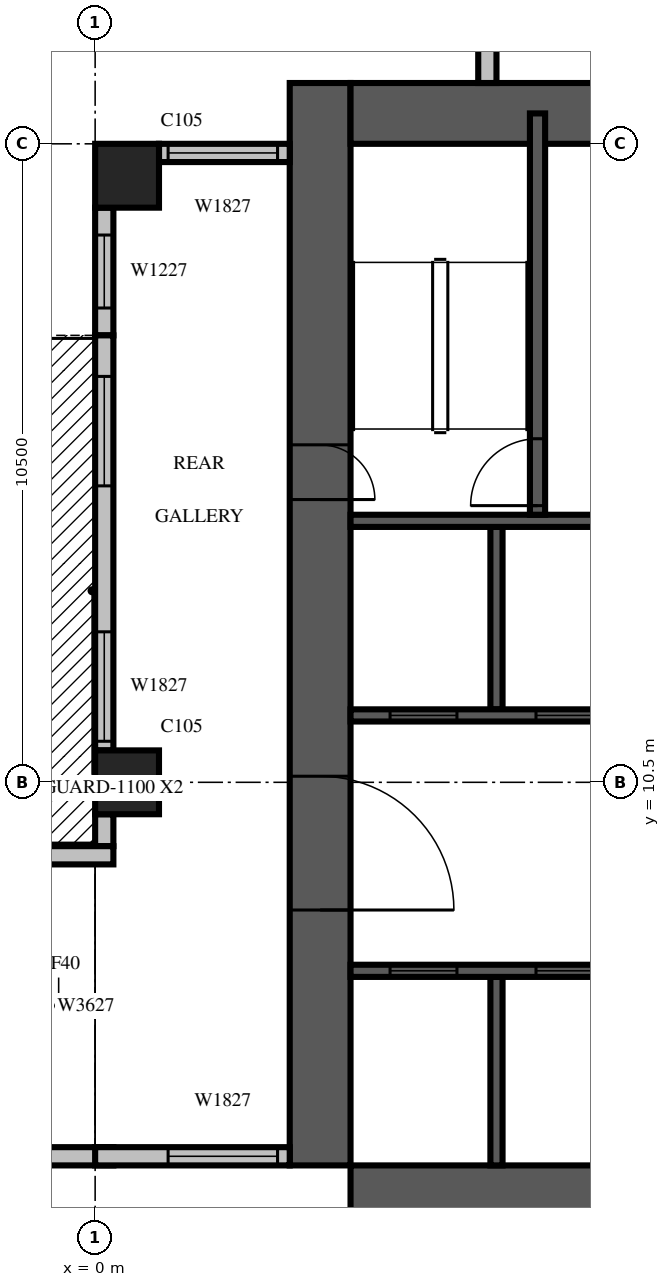
"""IFC4 building model, lengths in metres.
Left out: names, types, materials, properties, quantities, classifications, styles, units other than length and angle.
Written with IfcOpenShell. Run it as: python <this file> out.ifc"""

import sys

from ifc_helpers import new_model, si_unit, direction, frame, frame_2d, origin, origin_2d, place, context, subcontext, project, spatial, rectangle, extrude, source, transform, mapped, element, fill, save


model = new_model("IFC4")
c1 = context("Model", 3, precision=1e-05, world=origin(), true_north=direction((0.0, 1.0)))
c2 = subcontext(c1, "Body", "Model", "MODEL_VIEW")
j1 = project(units=[si_unit("LENGTHUNIT", "METRE"), si_unit("PLANEANGLEUNIT", "RADIAN")], contexts=[c1])
p1 = place(None, origin())
s1 = spatial("IfcSite", under=j1, at=p1, CompositionType="ELEMENT")
p2 = place(p1, origin())
s2 = spatial("IfcBuilding", under=s1, at=p2, CompositionType="ELEMENT")
p3 = place(p2, frame((0.0, 0.0, 149.7)))
s3 = spatial("IfcBuildingStorey", under=s2, at=p3, CompositionType="ELEMENT", Elevation=149.7)
m1 = source(origin(), c2, "Body", "SweptSolid", [
    extrude(rectangle(XDim=1.05, YDim=1.05, at=origin_2d()), origin(), (0.0, 0.0, 1.0), 4.2),
])
for number, where, z_axis, x_axis in (
    (1, (0.525, 10.5, 0.0), (0.0, 0.0, 1.0), (1.0, 0.0, 0.0)),
    (2, (0.525, 20.475, 0.0), (0.0, 0.0, 1.0), (1.0, 0.0, 0.0)),
):
    element("IfcColumn", number, at=place(p3, frame(where, z_axis=z_axis, x_axis=x_axis)), inside=s3, PredefinedType="COLUMN", context=c2, shape_type="MappedRepresentation", body=[
        mapped(m1, transform((0.0, 0.0, 0.0), scale=1.0)),
    ])
m2 = source(origin(), c2, "Body", "SweptSolid", [
    extrude(rectangle(XDim=17.8, YDim=1.0, at=frame_2d((8.9, 0.0))), origin(), (0.0, 0.0, 1.0), 4.2),
])
p4 = place(p3, frame((3.7, 4.2, 0.0), z_axis=(0.0, 0.0, 1.0), x_axis=(0.0, 1.0, 0.0)))
e3 = element("IfcWall", 3, at=p4, inside=s3, PredefinedType="SHEAR", context=c2, shape_type="MappedRepresentation", body=[
    mapped(m2, transform((0.0, 0.0, 0.0), scale=1.0)),
])
m3 = source(origin(), c2, "Body", "SweptSolid", [
    extrude(rectangle(XDim=2.2, YDim=2.1, at=frame_2d((1.1, 1.05))), frame((0.0, 0.51, 0.0), z_axis=(0.0, -1.0, 0.0), x_axis=(1.0, 0.0, 0.0)), (0.0, 0.0, 1.0), 1.02),
])
p5 = place(p4, frame((4.2, 0.0, 0.0)))
e4 = element("IfcOpeningElement", 4, at=p5, cuts=e3, PredefinedType="OPENING", context=c2, shape_type="MappedRepresentation", body=[
    mapped(m3, transform((0.0, 0.0, 0.0), scale=1.0)),
])
m4 = source(origin(), c2, "Body", "SweptSolid", [
    extrude(rectangle(XDim=0.9, YDim=2.1, at=frame_2d((0.45, 1.05))), frame((0.0, 0.51, 0.0), z_axis=(0.0, -1.0, 0.0), x_axis=(1.0, 0.0, 0.0)), (0.0, 0.0, 1.0), 1.02),
])
p6 = place(p4, frame((10.95, 0.0, 0.0)))
e5 = element("IfcOpeningElement", 5, at=p6, cuts=e3, PredefinedType="OPENING", context=c2, shape_type="MappedRepresentation", body=[
    mapped(m4, transform((0.0, 0.0, 0.0), scale=1.0)),
])
p7 = place(p3, frame((4.2, 3.7, 0.0), z_axis=(0.0, 0.0, 1.0), x_axis=(1.0, 0.0, 0.0)))
e6 = element("IfcWall", 6, at=p7, inside=s3, PredefinedType="SHEAR", context=c2, shape_type="MappedRepresentation", body=[
    mapped(m2, transform((0.0, 0.0, 0.0), scale=1.0)),
])
m5 = source(origin(), c2, "Body", "SweptSolid", [
    extrude(rectangle(XDim=16.8, YDim=1.0, at=frame_2d((8.4, 0.0))), origin(), (0.0, 0.0, 1.0), 4.2),
])
p8 = place(p3, frame((4.2, 21.5, 0.0), z_axis=(0.0, 0.0, 1.0), x_axis=(1.0, 0.0, 0.0)))
e7 = element("IfcWall", 7, at=p8, inside=s3, PredefinedType="SHEAR", context=c2, shape_type="MappedRepresentation", body=[
    mapped(m5, transform((0.0, 0.0, 0.0), scale=1.0)),
])
m6 = source(origin(), c2, "Body", "SweptSolid", [
    extrude(rectangle(XDim=1.2, YDim=2.1, at=frame_2d((0.6, 1.05))), frame((0.0, 0.51, 0.0), z_axis=(0.0, -1.0, 0.0), x_axis=(1.0, 0.0, 0.0)), (0.0, 0.0, 1.0), 1.02),
])
p9 = place(p8, frame((6.2, 0.0, 0.0)))
e8 = element("IfcOpeningElement", 8, at=p9, cuts=e7, PredefinedType="OPENING", context=c2, shape_type="MappedRepresentation", body=[
    mapped(m6, transform((0.0, 0.0, 0.0), scale=1.0)),
])
m7 = source(origin(), c2, "Body", "SweptSolid", [
    extrude(rectangle(XDim=16.4, YDim=0.3, at=frame_2d((8.2, 0.0))), origin(), (0.0, 0.0, 1.0), 3.8),
])
p10 = place(p3, frame((6.45, 38.4, 0.0), z_axis=(0.0, 0.0, 1.0), x_axis=(0.0, -1.0, 0.0)))
e9 = element("IfcWall", 9, at=p10, inside=s3, PredefinedType="STANDARD", context=c2, shape_type="MappedRepresentation", body=[
    mapped(m7, transform((0.0, 0.0, 0.0), scale=1.0)),
])
m8 = source(origin(), c2, "Body", "SweptSolid", [
    extrude(rectangle(XDim=1.8, YDim=2.7, at=frame_2d((0.9, 1.35))), frame((0.0, 0.16, 0.0), z_axis=(0.0, -1.0, 0.0), x_axis=(1.0, 0.0, 0.0)), (0.0, 0.0, 1.0), 0.32),
])
p11 = place(p10, frame((1.15, 0.0, 0.6)))
e10 = element("IfcOpeningElement", 10, at=p11, cuts=e9, PredefinedType="OPENING", context=c2, shape_type="MappedRepresentation", body=[
    mapped(m8, transform((0.0, 0.0, 0.0), scale=1.0)),
])
m9 = source(origin(), c2, "Body", "SweptSolid", [
    extrude(rectangle(XDim=2.4, YDim=2.7, at=frame_2d((1.2, 1.35))), frame((0.0, 0.16, 0.0), z_axis=(0.0, -1.0, 0.0), x_axis=(1.0, 0.0, 0.0)), (0.0, 0.0, 1.0), 0.32),
])
p12 = place(p10, frame((4.75, 0.0, 0.6)))
e11 = element("IfcOpeningElement", 11, at=p12, cuts=e9, PredefinedType="OPENING", context=c2, shape_type="MappedRepresentation", body=[
    mapped(m9, transform((0.0, 0.0, 0.0), scale=1.0)),
])
m10 = source(origin(), c2, "Body", "SweptSolid", [
    extrude(rectangle(XDim=1.2, YDim=2.7, at=frame_2d((0.6, 1.35))), frame((0.0, 0.16, 0.0), z_axis=(0.0, -1.0, 0.0), x_axis=(1.0, 0.0, 0.0)), (0.0, 0.0, 1.0), 0.32),
])
p13 = place(p10, frame((12.912, 0.0, 0.6)))
e12 = element("IfcOpeningElement", 12, at=p13, cuts=e9, PredefinedType="OPENING", context=c2, shape_type="MappedRepresentation", body=[
    mapped(m10, transform((0.0, 0.0, 0.0), scale=1.0)),
])
m11 = source(origin(), c2, "Body", "SweptSolid", [
    extrude(rectangle(XDim=1.0, YDim=2.1, at=frame_2d((0.5, 1.05))), frame((0.0, 0.16, 0.0), z_axis=(0.0, -1.0, 0.0), x_axis=(1.0, 0.0, 0.0)), (0.0, 0.0, 1.0), 0.32),
])
p14 = place(p10, frame((10.142, 0.0, 0.0)))
e13 = element("IfcOpeningElement", 13, at=p14, cuts=e9, PredefinedType="OPENING", context=c2, shape_type="MappedRepresentation", body=[
    mapped(m11, transform((0.0, 0.0, 0.0), scale=1.0)),
])
m12 = source(origin(), c2, "Body", "SweptSolid", [
    extrude(rectangle(XDim=2.15, YDim=0.3, at=frame_2d((1.075, 0.0))), origin(), (0.0, 0.0, 1.0), 3.8),
])
p15 = place(p3, frame((3.2, 20.85, 0.0), z_axis=(0.0, 0.0, 1.0), x_axis=(-1.0, 0.0, 0.0)))
e14 = element("IfcWall", 14, at=p15, inside=s3, PredefinedType="STANDARD", context=c2, shape_type="MappedRepresentation", body=[
    mapped(m12, transform((0.0, 0.0, 0.0), scale=1.0)),
])
p16 = place(p15, frame((0.2, 0.0, 0.6)))
e15 = element("IfcOpeningElement", 15, at=p16, cuts=e14, PredefinedType="OPENING", context=c2, shape_type="MappedRepresentation", body=[
    mapped(m8, transform((0.0, 0.0, 0.0), scale=1.0)),
])
m13 = source(origin(), c2, "Body", "SweptSolid", [
    extrude(rectangle(XDim=2.1, YDim=0.3, at=frame_2d((1.05, 0.0))), origin(), (0.0, 0.0, 1.0), 3.8),
])
p17 = place(p3, frame((0.15, 19.95, 0.0), z_axis=(0.0, 0.0, 1.0), x_axis=(0.0, -1.0, 0.0)))
e16 = element("IfcWall", 16, at=p17, inside=s3, PredefinedType="STANDARD", context=c2, shape_type="MappedRepresentation", body=[
    mapped(m13, transform((0.0, 0.0, 0.0), scale=1.0)),
])
p18 = place(p17, frame((0.45, 0.0, 0.6)))
e17 = element("IfcOpeningElement", 17, at=p18, cuts=e16, PredefinedType="OPENING", context=c2, shape_type="MappedRepresentation", body=[
    mapped(m10, transform((0.0, 0.0, 0.0), scale=1.0)),
])
m14 = source(origin(), c2, "Body", "SweptSolid", [
    extrude(rectangle(XDim=6.825, YDim=0.3, at=frame_2d((3.413, 0.0))), origin(), (0.0, 0.0, 1.0), 3.8),
])
p19 = place(p3, frame((0.15, 17.85, 0.0), z_axis=(0.0, 0.0, 1.0), x_axis=(0.0, -1.0, 0.0)))
e18 = element("IfcWall", 18, at=p19, inside=s3, PredefinedType="STANDARD", context=c2, shape_type="MappedRepresentation", body=[
    mapped(m14, transform((0.0, 0.0, 0.0), scale=1.0)),
])
m15 = source(origin(), c2, "Body", "SweptSolid", [
    extrude(rectangle(XDim=1.8, YDim=2.4, at=frame_2d((0.9, 1.2))), frame((0.0, 0.16, 0.0), z_axis=(0.0, -1.0, 0.0), x_axis=(1.0, 0.0, 0.0)), (0.0, 0.0, 1.0), 0.32),
])
p20 = place(p19, frame((0.675, 0.0, 0.0)))
e19 = element("IfcOpeningElement", 19, at=p20, cuts=e18, PredefinedType="OPENING", context=c2, shape_type="MappedRepresentation", body=[
    mapped(m15, transform((0.0, 0.0, 0.0), scale=1.0)),
])
p21 = place(p19, frame((4.875, 0.0, 0.6)))
e20 = element("IfcOpeningElement", 20, at=p21, cuts=e18, PredefinedType="OPENING", context=c2, shape_type="MappedRepresentation", body=[
    mapped(m8, transform((0.0, 0.0, 0.0), scale=1.0)),
])
m16 = source(origin(), c2, "Body", "SweptSolid", [
    extrude(rectangle(XDim=0.525, YDim=0.3, at=frame_2d((0.263, 0.0))), origin(), (0.0, 0.0, 1.0), 3.8),
])
p22 = place(p3, frame((0.15, 9.975, 0.0), z_axis=(0.0, 0.0, 1.0), x_axis=(0.0, -1.0, 0.0)))
e21 = element("IfcWall", 21, at=p22, inside=s3, PredefinedType="STANDARD", context=c2, shape_type="MappedRepresentation", body=[
    mapped(m16, transform((0.0, 0.0, 0.0), scale=1.0)),
])
m17 = source(origin(), c2, "Body", "SweptSolid", [
    extrude(rectangle(XDim=1.2, YDim=0.3, at=frame_2d((0.6, 0.0))), origin(), (0.0, 0.0, 1.0), 3.8),
])
for number, where, z_axis, x_axis in (
    (22, (0.3, 9.3, 0.0), (0.0, 0.0, 1.0), (-1.0, 0.0, 0.0)),
    (23, (0.3, 4.35, 0.0), (0.0, 0.0, 1.0), (-1.0, 0.0, 0.0)),
):
    element("IfcWall", number, at=place(p3, frame(where, z_axis=z_axis, x_axis=x_axis)), inside=s3, PredefinedType="STANDARD", context=c2, shape_type="MappedRepresentation", body=[
        mapped(m17, transform((0.0, 0.0, 0.0), scale=1.0)),
    ])
m18 = source(origin(), c2, "Body", "SweptSolid", [
    extrude(rectangle(XDim=3.2, YDim=0.3, at=frame_2d((1.6, 0.0))), origin(), (0.0, 0.0, 1.0), 3.8),
])
p23 = place(p3, frame((0.0, 4.35, 0.0), z_axis=(0.0, 0.0, 1.0), x_axis=(1.0, 0.0, 0.0)))
e24 = element("IfcWall", 24, at=p23, inside=s3, PredefinedType="STANDARD", context=c2, shape_type="MappedRepresentation", body=[
    mapped(m18, transform((0.0, 0.0, 0.0), scale=1.0)),
])
p24 = place(p23, frame((1.2, 0.0, 0.6)))
e25 = element("IfcOpeningElement", 25, at=p24, cuts=e24, PredefinedType="OPENING", context=c2, shape_type="MappedRepresentation", body=[
    mapped(m8, transform((0.0, 0.0, 0.0), scale=1.0)),
])
m19 = source(origin(), c2, "Body", "SweptSolid", [
    extrude(rectangle(XDim=3.1, YDim=0.2, at=frame_2d((1.55, 0.0))), origin(), (0.0, 0.0, 1.0), 4.2),
])
p25 = place(p3, frame((6.6, 4.2, 0.0), z_axis=(0.0, 0.0, 1.0), x_axis=(0.0, 1.0, 0.0)))
e26 = element("IfcWall", 26, at=p25, inside=s3, PredefinedType="SOLIDWALL", context=c2, shape_type="MappedRepresentation", body=[
    mapped(m19, transform((0.0, 0.0, 0.0), scale=1.0)),
])
m20 = source(origin(), c2, "Body", "SweptSolid", [
    extrude(rectangle(XDim=3.0, YDim=0.2, at=frame_2d((1.5, 0.0))), origin(), (0.0, 0.0, 1.0), 4.2),
])
p26 = place(p3, frame((6.6, 11.7, 0.0), z_axis=(0.0, 0.0, 1.0), x_axis=(0.0, 1.0, 0.0)))
e27 = element("IfcWall", 27, at=p26, inside=s3, PredefinedType="SOLIDWALL", context=c2, shape_type="MappedRepresentation", body=[
    mapped(m20, transform((0.0, 0.0, 0.0), scale=1.0)),
])
m21 = source(origin(), c2, "Body", "SweptSolid", [
    extrude(rectangle(XDim=16.8, YDim=0.2, at=frame_2d((8.4, 0.0))), origin(), (0.0, 0.0, 1.0), 4.2),
])
p27 = place(p3, frame((4.2, 7.4, 0.0), z_axis=(0.0, 0.0, 1.0), x_axis=(1.0, 0.0, 0.0)))
e28 = element("IfcWall", 28, at=p27, inside=s3, PredefinedType="SOLIDWALL", context=c2, shape_type="MappedRepresentation", body=[
    mapped(m21, transform((0.0, 0.0, 0.0), scale=1.0)),
])
m22 = source(origin(), c2, "Body", "SweptSolid", [
    extrude(rectangle(XDim=1.1, YDim=2.1, at=frame_2d((0.55, 1.05))), frame((0.0, 0.11, 0.0), z_axis=(0.0, -1.0, 0.0), x_axis=(1.0, 0.0, 0.0)), (0.0, 0.0, 1.0), 0.22),
])
p28 = place(p27, frame((0.65, 0.0, 0.0)))
e29 = element("IfcOpeningElement", 29, at=p28, cuts=e28, PredefinedType="OPENING", context=c2, shape_type="MappedRepresentation", body=[
    mapped(m22, transform((0.0, 0.0, 0.0), scale=1.0)),
])
p29 = place(p27, frame((3.05, 0.0, 0.0)))
e30 = element("IfcOpeningElement", 30, at=p29, cuts=e28, PredefinedType="OPENING", context=c2, shape_type="MappedRepresentation", body=[
    mapped(m22, transform((0.0, 0.0, 0.0), scale=1.0)),
])
p30 = place(p27, frame((5.45, 0.0, 0.0)))
e31 = element("IfcOpeningElement", 31, at=p30, cuts=e28, PredefinedType="OPENING", context=c2, shape_type="MappedRepresentation", body=[
    mapped(m22, transform((0.0, 0.0, 0.0), scale=1.0)),
])
p31 = place(p27, frame((7.85, 0.0, 0.0)))
e32 = element("IfcOpeningElement", 32, at=p31, cuts=e28, PredefinedType="OPENING", context=c2, shape_type="MappedRepresentation", body=[
    mapped(m22, transform((0.0, 0.0, 0.0), scale=1.0)),
])
p32 = place(p3, frame((4.2, 11.6, 0.0), z_axis=(0.0, 0.0, 1.0), x_axis=(1.0, 0.0, 0.0)))
e33 = element("IfcWall", 33, at=p32, inside=s3, PredefinedType="SOLIDWALL", context=c2, shape_type="MappedRepresentation", body=[
    mapped(m21, transform((0.0, 0.0, 0.0), scale=1.0)),
])
p33 = place(p32, frame((0.65, 0.0, 0.0)))
e34 = element("IfcOpeningElement", 34, at=p33, cuts=e33, PredefinedType="OPENING", context=c2, shape_type="MappedRepresentation", body=[
    mapped(m22, transform((0.0, 0.0, 0.0), scale=1.0)),
])
p34 = place(p32, frame((3.05, 0.0, 0.0)))
e35 = element("IfcOpeningElement", 35, at=p34, cuts=e33, PredefinedType="OPENING", context=c2, shape_type="MappedRepresentation", body=[
    mapped(m22, transform((0.0, 0.0, 0.0), scale=1.0)),
])
p35 = place(p32, frame((5.45, 0.0, 0.0)))
e36 = element("IfcOpeningElement", 36, at=p35, cuts=e33, PredefinedType="OPENING", context=c2, shape_type="MappedRepresentation", body=[
    mapped(m22, transform((0.0, 0.0, 0.0), scale=1.0)),
])
p36 = place(p3, frame((4.2, 14.8, 0.0), z_axis=(0.0, 0.0, 1.0), x_axis=(1.0, 0.0, 0.0)))
e37 = element("IfcWall", 37, at=p36, inside=s3, PredefinedType="SOLIDWALL", context=c2, shape_type="MappedRepresentation", body=[
    mapped(m21, transform((0.0, 0.0, 0.0), scale=1.0)),
])
p37 = place(p36, frame((10.25, 0.0, 0.0)))
e38 = element("IfcOpeningElement", 38, at=p37, cuts=e37, PredefinedType="OPENING", context=c2, shape_type="MappedRepresentation", body=[
    mapped(m22, transform((0.0, 0.0, 0.0), scale=1.0)),
])
p38 = place(p36, frame((12.65, 0.0, 0.0)))
e39 = element("IfcOpeningElement", 39, at=p38, cuts=e37, PredefinedType="OPENING", context=c2, shape_type="MappedRepresentation", body=[
    mapped(m22, transform((0.0, 0.0, 0.0), scale=1.0)),
])
p39 = place(p36, frame((15.05, 0.0, 0.0)))
e40 = element("IfcOpeningElement", 40, at=p39, cuts=e37, PredefinedType="OPENING", context=c2, shape_type="MappedRepresentation", body=[
    mapped(m22, transform((0.0, 0.0, 0.0), scale=1.0)),
])
m23 = source(origin(), c2, "Body", "SweptSolid", [
    extrude(rectangle(XDim=6.6, YDim=0.25, at=frame_2d((3.3, 0.0))), origin(), (0.0, 0.0, 1.0), 3.8),
])
p40 = place(p3, frame((7.275, 14.9, 0.0), z_axis=(0.0, 0.0, 1.0), x_axis=(0.0, 1.0, 0.0)))
e41 = element("IfcWall", 41, at=p40, inside=s3, PredefinedType="SOLIDWALL", context=c2, shape_type="MappedRepresentation", body=[
    mapped(m23, transform((0.0, 0.0, 0.0), scale=1.0)),
])
m24 = source(origin(), c2, "Body", "SweptSolid", [
    extrude(rectangle(XDim=1.1, YDim=2.1, at=frame_2d((0.55, 1.05))), frame((0.0, 0.135, 0.0), z_axis=(0.0, -1.0, 0.0), x_axis=(1.0, 0.0, 0.0)), (0.0, 0.0, 1.0), 0.27),
])
p41 = place(p40, frame((0.15, 0.0, 0.0)))
e42 = element("IfcOpeningElement", 42, at=p41, cuts=e41, PredefinedType="OPENING", context=c2, shape_type="MappedRepresentation", body=[
    mapped(m24, transform((0.0, 0.0, 0.0), scale=1.0)),
])
m25 = source(origin(), c2, "Body", "SweptSolid", [
    extrude(rectangle(XDim=1.8, YDim=2.7, at=frame_2d((0.9, 1.35))), frame((0.0, 0.03, 0.0), z_axis=(0.0, -1.0, 0.0), x_axis=(1.0, 0.0, 0.0)), (0.0, 0.0, 1.0), 0.06),
])
p42 = place(p16, origin())
e43 = element("IfcWindow", 43, at=p42, inside=s3, PartitioningType="SINGLE_PANEL", PredefinedType="WINDOW", context=c2, shape_type="MappedRepresentation", body=[
    mapped(m25, transform((0.0, 0.0, 0.0), scale=1.0)),
])
fill(e15, e43)
m26 = source(origin(), c2, "Body", "SweptSolid", [
    extrude(rectangle(XDim=1.2, YDim=2.7, at=frame_2d((0.6, 1.35))), frame((0.0, 0.03, 0.0), z_axis=(0.0, -1.0, 0.0), x_axis=(1.0, 0.0, 0.0)), (0.0, 0.0, 1.0), 0.06),
])
p43 = place(p18, origin())
e44 = element("IfcWindow", 44, at=p43, inside=s3, PartitioningType="SINGLE_PANEL", PredefinedType="WINDOW", context=c2, shape_type="MappedRepresentation", body=[
    mapped(m26, transform((0.0, 0.0, 0.0), scale=1.0)),
])
fill(e17, e44)
m27 = source(origin(), c2, "Body", "SweptSolid", [
    extrude(rectangle(XDim=1.8, YDim=2.4, at=frame_2d((0.9, 1.2))), frame((0.0, 0.025, 0.0), z_axis=(0.0, -1.0, 0.0), x_axis=(1.0, 0.0, 0.0)), (0.0, 0.0, 1.0), 0.05),
])
p44 = place(p20, origin())
e45 = element("IfcDoor", 45, at=p44, inside=s3, OperationType="SLIDING_TO_LEFT", PredefinedType="DOOR", context=c2, shape_type="MappedRepresentation", body=[
    mapped(m27, transform((0.0, 0.0, 0.0), scale=1.0)),
])
fill(e19, e45)
p45 = place(p21, origin())
e46 = element("IfcWindow", 46, at=p45, inside=s3, PartitioningType="SINGLE_PANEL", PredefinedType="WINDOW", context=c2, shape_type="MappedRepresentation", body=[
    mapped(m25, transform((0.0, 0.0, 0.0), scale=1.0)),
])
fill(e20, e46)
p46 = place(p24, origin())
e47 = element("IfcWindow", 47, at=p46, inside=s3, PartitioningType="SINGLE_PANEL", PredefinedType="WINDOW", context=c2, shape_type="MappedRepresentation", body=[
    mapped(m25, transform((0.0, 0.0, 0.0), scale=1.0)),
])
fill(e25, e47)
m28 = source(origin(), c2, "Body", "SweptSolid", [
    extrude(rectangle(XDim=1.1, YDim=2.1, at=frame_2d((0.55, 1.05))), frame((0.0, 0.025, 0.0), z_axis=(0.0, -1.0, 0.0), x_axis=(1.0, 0.0, 0.0)), (0.0, 0.0, 1.0), 0.05),
])
p47 = place(p28, origin())
e48 = element("IfcDoor", 48, at=p47, inside=s3, OperationType="SLIDING_TO_LEFT", PredefinedType="DOOR", context=c2, shape_type="MappedRepresentation", body=[
    mapped(m28, transform((0.0, 0.0, 0.0), scale=1.0)),
])
fill(e29, e48)
p48 = place(p29, origin())
e49 = element("IfcDoor", 49, at=p48, inside=s3, OperationType="SLIDING_TO_LEFT", PredefinedType="DOOR", context=c2, shape_type="MappedRepresentation", body=[
    mapped(m28, transform((0.0, 0.0, 0.0), scale=1.0)),
])
fill(e30, e49)
p49 = place(p33, origin())
e50 = element("IfcDoor", 50, at=p49, inside=s3, OperationType="SLIDING_TO_LEFT", PredefinedType="DOOR", context=c2, shape_type="MappedRepresentation", body=[
    mapped(m28, transform((0.0, 0.0, 0.0), scale=1.0)),
])
fill(e34, e50)
p50 = place(p34, origin())
e51 = element("IfcDoor", 51, at=p50, inside=s3, OperationType="SLIDING_TO_LEFT", PredefinedType="DOOR", context=c2, shape_type="MappedRepresentation", body=[
    mapped(m28, transform((0.0, 0.0, 0.0), scale=1.0)),
])
fill(e35, e51)
p51 = place(p41, origin())
e52 = element("IfcDoor", 52, at=p51, inside=s3, OperationType="SINGLE_SWING_LEFT", PredefinedType="DOOR", context=c2, shape_type="MappedRepresentation", body=[
    mapped(m28, transform((0.0, 0.0, 0.0), scale=1.0)),
])
fill(e42, e52)
m29 = source(origin(), c2, "Body", "SweptSolid", [
    extrude(rectangle(XDim=2.2, YDim=2.1, at=frame_2d((1.1, 1.05))), frame((0.0, 0.025, 0.0), z_axis=(0.0, -1.0, 0.0), x_axis=(1.0, 0.0, 0.0)), (0.0, 0.0, 1.0), 0.05),
])
p52 = place(p5, origin())
e53 = element("IfcDoor", 53, at=p52, inside=s3, OperationType="DOUBLE_DOOR_SINGLE_SWING", PredefinedType="DOOR", context=c2, shape_type="MappedRepresentation", body=[
    mapped(m29, transform((0.0, 0.0, 0.0), scale=1.0)),
])
fill(e4, e53)
m30 = source(origin(), c2, "Body", "SweptSolid", [
    extrude(rectangle(XDim=0.9, YDim=2.1, at=frame_2d((0.45, 1.05))), frame((0.0, 0.025, 0.0), z_axis=(0.0, -1.0, 0.0), x_axis=(1.0, 0.0, 0.0)), (0.0, 0.0, 1.0), 0.05),
])
p53 = place(p6, origin())
e54 = element("IfcDoor", 54, at=p53, inside=s3, OperationType="SINGLE_SWING_RIGHT", PredefinedType="DOOR", context=c2, shape_type="MappedRepresentation", body=[
    mapped(m30, transform((0.0, 0.0, 0.0), scale=1.0)),
])
fill(e5, e54)
save(model, sys.argv[1])
